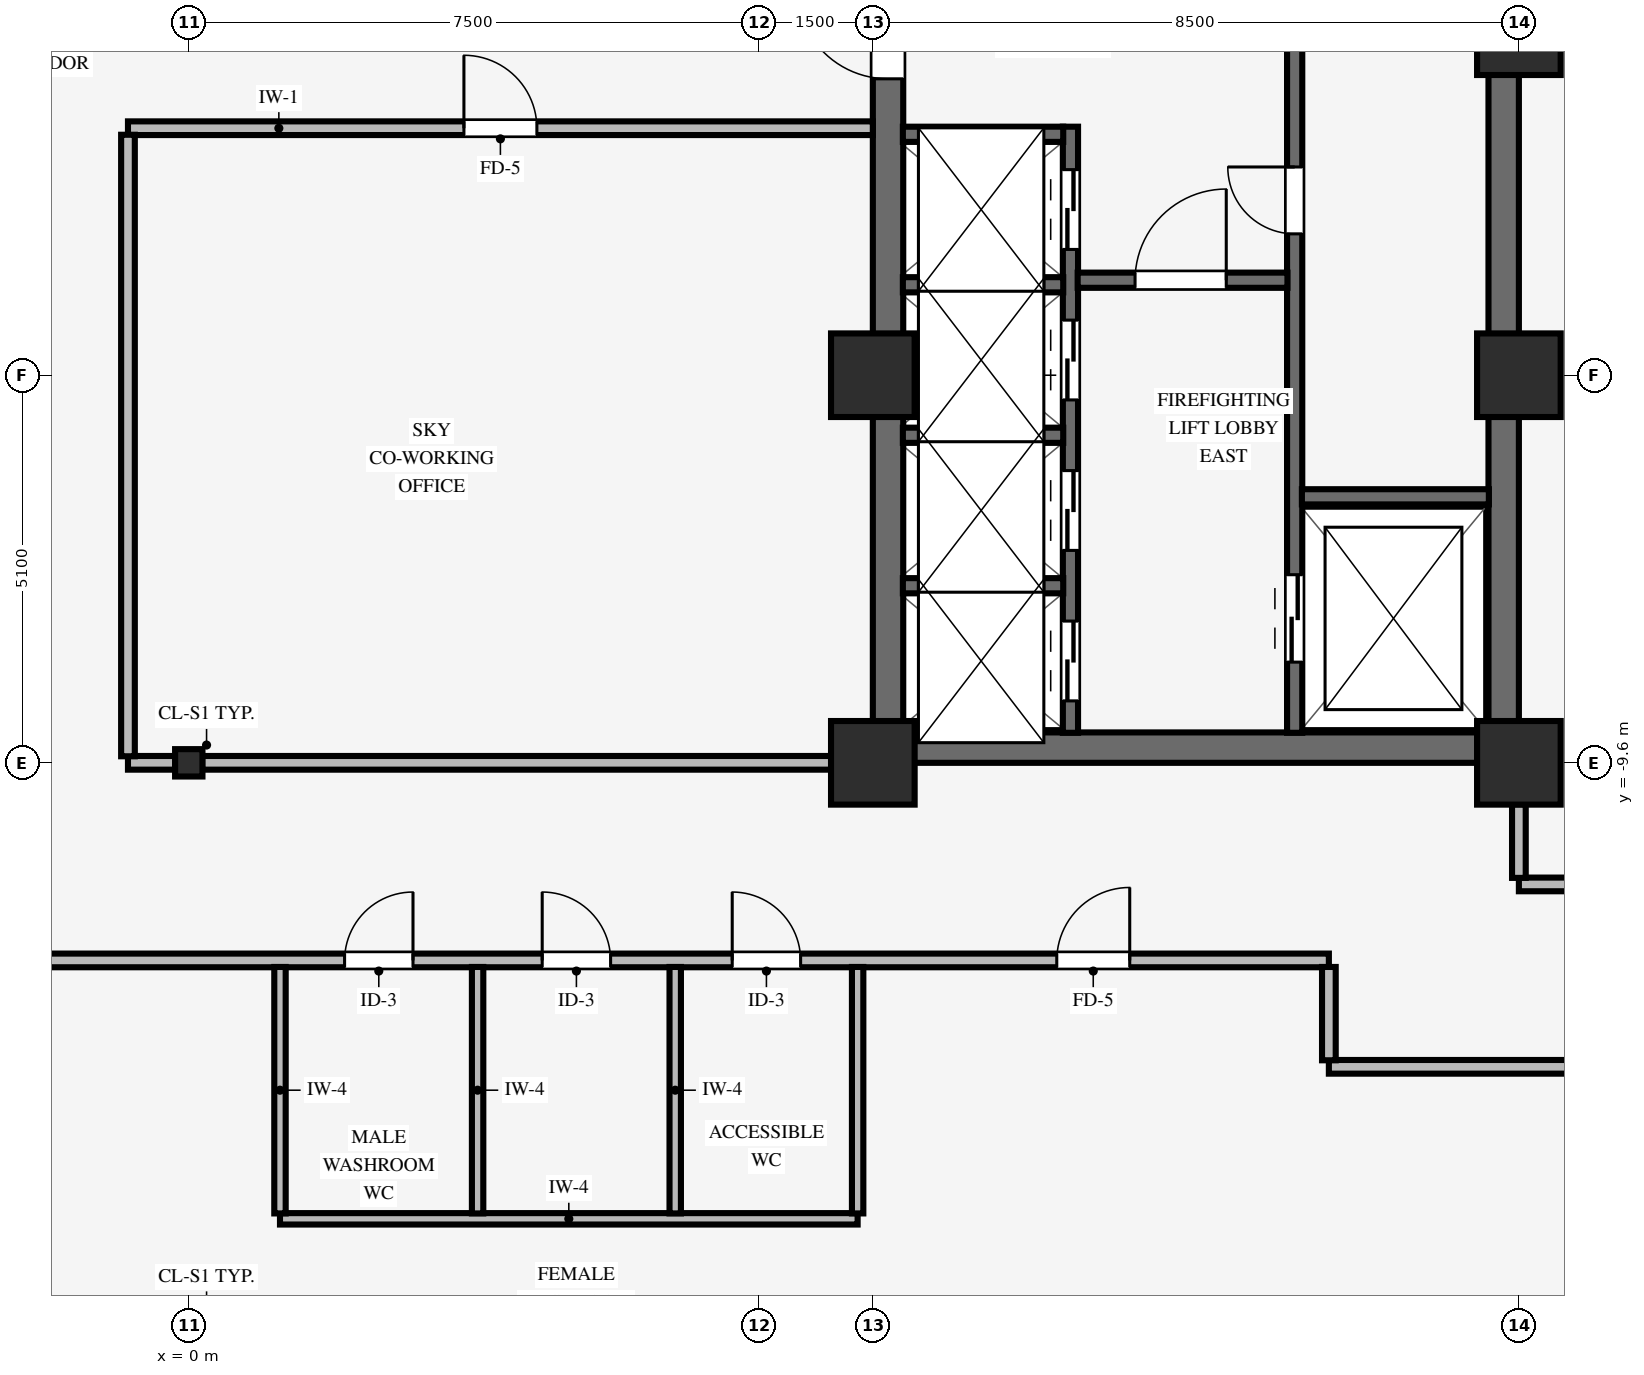
"""IFC4 building model, lengths in metres.
Left out: names, types, materials, properties, quantities, classifications, styles, units other than length and angle.
Written with IfcOpenShell. Run it as: python <this file> out.ifc"""

import sys

from ifc_helpers import new_model, si_unit, direction, frame, frame_2d, origin, origin_2d, place, context, subcontext, project, spatial, rectangle, i_section, extrude, source, transform, mapped, element, fill, save


model = new_model("IFC4")
c1 = context("Model", 3, precision=1e-05, world=origin(), true_north=direction((0.0, 1.0)))
c2 = subcontext(c1, "Body", "Model", "MODEL_VIEW")
j1 = project(units=[si_unit("LENGTHUNIT", "METRE"), si_unit("PLANEANGLEUNIT", "RADIAN")], contexts=[c1])
p1 = place(None, origin())
s1 = spatial("IfcSite", under=j1, at=p1, CompositionType="ELEMENT")
p2 = place(p1, origin())
s2 = spatial("IfcBuilding", under=s1, at=p2, CompositionType="ELEMENT")
p3 = place(p2, frame((0.0, 0.0, 120.2)))
s3 = spatial("IfcBuildingStorey", under=s2, at=p3, CompositionType="ELEMENT", Elevation=120.2)
p4 = place(p3, frame((9.0, -9.4, 0.0), z_axis=(0.0, 0.0, 1.0), x_axis=(1.0, 0.0, 0.0)))
e1 = element("IfcWall", 1, at=p4, inside=s3, PredefinedType="SHEAR", context=c2, shape_type="SweptSolid", body=[
    extrude(rectangle(XDim=8.5, YDim=0.4, at=frame_2d((4.25, 0.0))), origin(), (0.0, 0.0, 1.0), 3.37),
])
p5 = place(p3, frame((9.2, -9.205, 0.0), z_axis=(0.0, 0.0, 1.0), x_axis=(0.0, 1.0, 0.0)))
e2 = element("IfcWall", 2, at=p5, inside=s3, PredefinedType="SHEAR", context=c2, shape_type="SweptSolid", body=[
    extrude(rectangle(XDim=18.41, YDim=0.4, at=frame_2d((9.205, 0.0))), origin(), (0.0, 0.0, 1.0), 3.37),
])
p6 = place(p5, frame((8.605, 0.0, 0.0)))
e3 = element("IfcOpeningElement", 3, at=p6, cuts=e2, PredefinedType="OPENING", context=c2, shape_type="SweptSolid", body=[
    extrude(rectangle(XDim=1.2, YDim=2.15, at=frame_2d((0.6, 1.075))), frame((0.0, 0.21, 0.0), z_axis=(0.0, -1.0, 0.0), x_axis=(1.0, 0.0, 0.0)), (0.0, 0.0, 1.0), 0.42),
])
p7 = place(p3, frame((17.3, -9.205, 0.0), z_axis=(0.0, 0.0, 1.0), x_axis=(0.0, 1.0, 0.0)))
e4 = element("IfcWall", 4, at=p7, inside=s3, PredefinedType="SHEAR", context=c2, shape_type="SweptSolid", body=[
    extrude(rectangle(XDim=18.41, YDim=0.4, at=frame_2d((9.205, 0.0))), origin(), (0.0, 0.0, 1.0), 3.37),
])
for number, where, z_axis, x_axis in (
    (5, (9.0, -9.6, 0.0), (0.0, 0.0, 1.0), (1.0, 0.0, 0.0)),
    (6, (9.0, -4.5, 0.0), (0.0, 0.0, 1.0), (1.0, 0.0, 0.0)),
    (7, (17.5, -9.6, 0.0), (0.0, 0.0, 1.0), (1.0, 0.0, 0.0)),
    (8, (17.5, -4.5, 0.0), (0.0, 0.0, 1.0), (1.0, 0.0, 0.0)),
    (9, (17.5, 0.0, 0.0), (0.0, 0.0, 1.0), (1.0, 0.0, 0.0)),
):
    element("IfcColumn", number, at=place(p3, frame(where, z_axis=z_axis, x_axis=x_axis)), inside=s3, PredefinedType="COLUMN", context=c2, shape_type="SweptSolid", body=[
        extrude(rectangle(XDim=1.1, YDim=1.1, at=origin_2d()), origin(), (0.0, 0.0, 1.0), 3.37),
    ])
p8 = place(p3, frame((0.0, -9.6, 0.0), z_axis=(0.0, 0.0, 1.0), x_axis=(1.0, 0.0, 0.0)))
e10 = element("IfcColumn", 10, at=p8, inside=s3, PredefinedType="COLUMN", context=c2, shape_type="SweptSolid", body=[
    extrude(i_section(OverallWidth=0.36, OverallDepth=0.36, WebThickness=0.021, FlangeThickness=0.021, FilletRadius=0.018, at=origin_2d()), origin(), (0.0, 0.0, 1.0), 3.37),
])
p9 = place(p3, frame((14.55, -9.205, 0.0), z_axis=(0.0, 0.0, 1.0), x_axis=(0.0, 1.0, 0.0)))
e11 = element("IfcWall", 11, at=p9, inside=s3, PredefinedType="SHEAR", context=c2, shape_type="SweptSolid", body=[
    extrude(rectangle(XDim=10.11, YDim=0.2, at=frame_2d((5.055, 0.0))), origin(), (0.0, 0.0, 1.0), 3.37),
])
p10 = place(p9, frame((6.565, 0.0, 0.0)))
e12 = element("IfcOpeningElement", 12, at=p10, cuts=e11, PredefinedType="OPENING", context=c2, shape_type="SweptSolid", body=[
    extrude(rectangle(XDim=0.88, YDim=2.1, at=frame_2d((0.44, 1.05))), frame((0.0, 0.11, 0.0), z_axis=(0.0, -1.0, 0.0), x_axis=(1.0, 0.0, 0.0)), (0.0, 0.0, 1.0), 0.22),
])
p11 = place(p9, frame((0.93, 0.0, 0.0)))
e13 = element("IfcOpeningElement", 13, at=p11, cuts=e11, PredefinedType="OPENING", context=c2, shape_type="SweptSolid", body=[
    extrude(rectangle(XDim=1.15, YDim=2.15, at=frame_2d((0.575, 1.075))), frame((0.0, 0.11, 0.0), z_axis=(0.0, -1.0, 0.0), x_axis=(1.0, 0.0, 0.0)), (0.0, 0.0, 1.0), 0.22),
])
p12 = place(p3, frame((14.645, -6.1, 0.0), z_axis=(0.0, 0.0, 1.0), x_axis=(1.0, 0.0, 0.0)))
e14 = element("IfcWall", 14, at=p12, inside=s3, PredefinedType="SHEAR", context=c2, shape_type="SweptSolid", body=[
    extrude(rectangle(XDim=2.46, YDim=0.2, at=frame_2d((1.23, 0.0))), origin(), (0.0, 0.0, 1.0), 3.37),
])
p13 = place(p3, frame((11.6, -9.205, 0.0), z_axis=(0.0, 0.0, 1.0), x_axis=(0.0, 1.0, 0.0)))
e15 = element("IfcWall", 15, at=p13, inside=s3, PredefinedType="SHEAR", context=c2, shape_type="SweptSolid", body=[
    extrude(rectangle(XDim=7.975, YDim=0.2, at=frame_2d((3.988, 0.0))), origin(), (0.0, 0.0, 1.0), 3.37),
])
p14 = place(p13, frame((0.42, 0.0, 0.0)))
e16 = element("IfcOpeningElement", 16, at=p14, cuts=e15, PredefinedType="OPENING", context=c2, shape_type="SweptSolid", body=[
    extrude(rectangle(XDim=1.05, YDim=2.15, at=frame_2d((0.525, 1.075))), frame((0.0, 0.11, 0.0), z_axis=(0.0, -1.0, 0.0), x_axis=(1.0, 0.0, 0.0)), (0.0, 0.0, 1.0), 0.22),
])
p15 = place(p13, frame((2.4, 0.0, 0.0)))
e17 = element("IfcOpeningElement", 17, at=p15, cuts=e15, PredefinedType="OPENING", context=c2, shape_type="SweptSolid", body=[
    extrude(rectangle(XDim=1.05, YDim=2.15, at=frame_2d((0.525, 1.075))), frame((0.0, 0.11, 0.0), z_axis=(0.0, -1.0, 0.0), x_axis=(1.0, 0.0, 0.0)), (0.0, 0.0, 1.0), 0.22),
])
p16 = place(p13, frame((4.38, 0.0, 0.0)))
e18 = element("IfcOpeningElement", 18, at=p16, cuts=e15, PredefinedType="OPENING", context=c2, shape_type="SweptSolid", body=[
    extrude(rectangle(XDim=1.05, YDim=2.15, at=frame_2d((0.525, 1.075))), frame((0.0, 0.11, 0.0), z_axis=(0.0, -1.0, 0.0), x_axis=(1.0, 0.0, 0.0)), (0.0, 0.0, 1.0), 0.22),
])
p17 = place(p13, frame((6.36, 0.0, 0.0)))
e19 = element("IfcOpeningElement", 19, at=p17, cuts=e15, PredefinedType="OPENING", context=c2, shape_type="SweptSolid", body=[
    extrude(rectangle(XDim=1.05, YDim=2.15, at=frame_2d((0.525, 1.075))), frame((0.0, 0.11, 0.0), z_axis=(0.0, -1.0, 0.0), x_axis=(1.0, 0.0, 0.0)), (0.0, 0.0, 1.0), 0.22),
])
p18 = place(p3, frame((11.695, -3.25, 0.0), z_axis=(0.0, 0.0, 1.0), x_axis=(1.0, 0.0, 0.0)))
e20 = element("IfcWall", 20, at=p18, inside=s3, PredefinedType="SHEAR", context=c2, shape_type="SweptSolid", body=[
    extrude(rectangle(XDim=2.76, YDim=0.2, at=frame_2d((1.38, 0.0))), origin(), (0.0, 0.0, 1.0), 3.37),
])
p19 = place(p18, frame((0.755, 0.0, 0.0)))
e21 = element("IfcOpeningElement", 21, at=p19, cuts=e20, PredefinedType="OPENING", context=c2, shape_type="SweptSolid", body=[
    extrude(rectangle(XDim=1.2, YDim=2.15, at=frame_2d((0.6, 1.075))), frame((0.0, 0.11, 0.0), z_axis=(0.0, -1.0, 0.0), x_axis=(1.0, 0.0, 0.0)), (0.0, 0.0, 1.0), 0.22),
])
for number, where, z_axis, x_axis in (
    (22, (9.395, -7.27, 0.0), (0.0, 0.0, 1.0), (1.0, 0.0, 0.0)),
    (23, (9.395, -5.29, 0.0), (0.0, 0.0, 1.0), (1.0, 0.0, 0.0)),
    (24, (9.395, -3.31, 0.0), (0.0, 0.0, 1.0), (1.0, 0.0, 0.0)),
    (25, (9.395, -1.33, 0.0), (0.0, 0.0, 1.0), (1.0, 0.0, 0.0)),
):
    element("IfcWall", number, at=place(p3, frame(where, z_axis=z_axis, x_axis=x_axis)), inside=s3, PredefinedType="SHEAR", context=c2, shape_type="SweptSolid", body=[
        extrude(rectangle(XDim=2.11, YDim=0.2, at=frame_2d((1.055, 0.0))), origin(), (0.0, 0.0, 1.0), 3.37),
    ])
p20 = place(p3, frame((1.2, -15.6, 0.0), z_axis=(0.0, 0.0, 1.0), x_axis=(1.0, 0.0, 0.0)))
e26 = element("IfcWall", 26, at=p20, inside=s3, PredefinedType="PARTITIONING", context=c2, shape_type="SweptSolid", body=[
    extrude(rectangle(XDim=7.6, YDim=0.15, at=frame_2d((3.8, 0.0))), origin(), (0.0, 0.0, 1.0), 3.36),
])
p21 = place(p3, frame((15.0, -13.6, 0.0), z_axis=(0.0, 0.0, 1.0), x_axis=(1.0, 0.0, 0.0)))
e27 = element("IfcWall", 27, at=p21, inside=s3, PredefinedType="PARTITIONING", context=c2, shape_type="SweptSolid", body=[
    extrude(rectangle(XDim=5.8, YDim=0.18, at=frame_2d((2.9, 0.0))), origin(), (0.0, 0.0, 1.0), 2.998),
])
p22 = place(p3, frame((-15.0, -12.2, 0.0), z_axis=(0.0, 0.0, 1.0), x_axis=(1.0, 0.0, 0.0)))
e28 = element("IfcWall", 28, at=p22, inside=s3, PredefinedType="PARTITIONING", context=c2, shape_type="SweptSolid", body=[
    extrude(rectangle(XDim=30.0, YDim=0.18, at=frame_2d((15.0, 0.0))), origin(), (0.0, 0.0, 1.0), 3.36),
])
p23 = place(p22, frame((5.42, 0.0, 0.0)))
e29 = element("IfcOpeningElement", 29, at=p23, cuts=e28, PredefinedType="OPENING", context=c2, shape_type="SweptSolid", body=[
    extrude(rectangle(XDim=0.96, YDim=2.1, at=frame_2d((0.48, 1.05))), frame((0.0, 0.1, 0.0), z_axis=(0.0, -1.0, 0.0), x_axis=(1.0, 0.0, 0.0)), (0.0, 0.0, 1.0), 0.2),
])
p24 = place(p22, frame((26.42, 0.0, 0.0)))
e30 = element("IfcOpeningElement", 30, at=p24, cuts=e28, PredefinedType="OPENING", context=c2, shape_type="SweptSolid", body=[
    extrude(rectangle(XDim=0.96, YDim=2.1, at=frame_2d((0.48, 1.05))), frame((0.0, 0.1, 0.0), z_axis=(0.0, -1.0, 0.0), x_axis=(1.0, 0.0, 0.0)), (0.0, 0.0, 1.0), 0.2),
])
p25 = place(p22, frame((19.65, 0.0, 0.0)))
e31 = element("IfcOpeningElement", 31, at=p25, cuts=e28, PredefinedType="OPENING", context=c2, shape_type="SweptSolid", body=[
    extrude(rectangle(XDim=0.9, YDim=2.1, at=frame_2d((0.45, 1.05))), frame((0.0, 0.1, 0.0), z_axis=(0.0, -1.0, 0.0), x_axis=(1.0, 0.0, 0.0)), (0.0, 0.0, 1.0), 0.2),
])
p26 = place(p22, frame((17.05, 0.0, 0.0)))
e32 = element("IfcOpeningElement", 32, at=p26, cuts=e28, PredefinedType="OPENING", context=c2, shape_type="SweptSolid", body=[
    extrude(rectangle(XDim=0.9, YDim=2.1, at=frame_2d((0.45, 1.05))), frame((0.0, 0.1, 0.0), z_axis=(0.0, -1.0, 0.0), x_axis=(1.0, 0.0, 0.0)), (0.0, 0.0, 1.0), 0.2),
])
p27 = place(p22, frame((22.15, 0.0, 0.0)))
e33 = element("IfcOpeningElement", 33, at=p27, cuts=e28, PredefinedType="OPENING", context=c2, shape_type="SweptSolid", body=[
    extrude(rectangle(XDim=0.9, YDim=2.1, at=frame_2d((0.45, 1.05))), frame((0.0, 0.1, 0.0), z_axis=(0.0, -1.0, 0.0), x_axis=(1.0, 0.0, 0.0)), (0.0, 0.0, 1.0), 0.2),
])
p28 = place(p3, frame((17.5, -11.2, 0.0), z_axis=(0.0, 0.0, 1.0), x_axis=(1.0, 0.0, 0.0)))
e34 = element("IfcWall", 34, at=p28, inside=s3, PredefinedType="PARTITIONING", context=c2, shape_type="SweptSolid", body=[
    extrude(rectangle(XDim=8.58, YDim=0.18, at=frame_2d((4.29, 0.0))), origin(), (0.0, 0.0, 1.0), 3.36),
])
p29 = place(p28, frame((1.17, 0.0, 0.0)))
e35 = element("IfcOpeningElement", 35, at=p29, cuts=e34, PredefinedType="OPENING", context=c2, shape_type="SweptSolid", body=[
    extrude(rectangle(XDim=0.96, YDim=2.1, at=frame_2d((0.48, 1.05))), frame((0.0, 0.1, 0.0), z_axis=(0.0, -1.0, 0.0), x_axis=(1.0, 0.0, 0.0)), (0.0, 0.0, 1.0), 0.2),
])
p30 = place(p3, frame((-0.8, -9.6, 0.0), z_axis=(0.0, 0.0, 1.0), x_axis=(1.0, 0.0, 0.0)))
e36 = element("IfcWall", 36, at=p30, inside=s3, PredefinedType="PARTITIONING", context=c2, shape_type="SweptSolid", body=[
    extrude(rectangle(XDim=0.624, YDim=0.18, at=frame_2d((0.312, 0.0))), origin(), (0.0, 0.0, 1.0), 2.405),
])
p31 = place(p3, frame((0.176, -9.6, 0.0), z_axis=(0.0, 0.0, 1.0), x_axis=(1.0, 0.0, 0.0)))
e37 = element("IfcWall", 37, at=p31, inside=s3, PredefinedType="PARTITIONING", context=c2, shape_type="SweptSolid", body=[
    extrude(rectangle(XDim=8.278, YDim=0.18, at=frame_2d((4.139, 0.0))), origin(), (0.0, 0.0, 1.0), 2.405),
])
p32 = place(p3, frame((-0.8, -1.25, 0.0), z_axis=(0.0, 0.0, 1.0), x_axis=(1.0, 0.0, 0.0)))
e38 = element("IfcWall", 38, at=p32, inside=s3, PredefinedType="PARTITIONING", context=c2, shape_type="SweptSolid", body=[
    extrude(rectangle(XDim=9.8, YDim=0.18, at=frame_2d((4.9, 0.0))), origin(), (0.0, 0.0, 1.0), 3.36),
])
p33 = place(p32, frame((4.42, 0.0, 0.0)))
e39 = element("IfcOpeningElement", 39, at=p33, cuts=e38, PredefinedType="OPENING", context=c2, shape_type="SweptSolid", body=[
    extrude(rectangle(XDim=0.96, YDim=2.1, at=frame_2d((0.48, 1.05))), frame((0.0, 0.1, 0.0), z_axis=(0.0, -1.0, 0.0), x_axis=(1.0, 0.0, 0.0)), (0.0, 0.0, 1.0), 0.2),
])
p34 = place(p3, frame((-0.8, -9.514, 0.0), z_axis=(0.0, 0.0, 1.0), x_axis=(0.0, 1.0, 0.0)))
e40 = element("IfcWall", 40, at=p34, inside=s3, PredefinedType="PARTITIONING", context=c2, shape_type="SweptSolid", body=[
    extrude(rectangle(XDim=8.178, YDim=0.18, at=frame_2d((4.089, 0.0))), origin(), (0.0, 0.0, 1.0), 3.36),
])
for number, where, z_axis, x_axis in (
    (41, (1.2, -15.529, 0.0), (0.0, 0.0, 1.0), (0.0, 1.0, 0.0)),
    (42, (3.8, -15.529, 0.0), (0.0, 0.0, 1.0), (0.0, 1.0, 0.0)),
    (43, (6.4, -15.529, 0.0), (0.0, 0.0, 1.0), (0.0, 1.0, 0.0)),
):
    element("IfcWall", number, at=place(p3, frame(where, z_axis=z_axis, x_axis=x_axis)), inside=s3, PredefinedType="PARTITIONING", context=c2, shape_type="SweptSolid", body=[
        extrude(rectangle(XDim=3.243, YDim=0.15, at=frame_2d((1.622, 0.0))), origin(), (0.0, 0.0, 1.0), 3.36),
    ])
p35 = place(p3, frame((8.8, -15.529, 0.0), z_axis=(0.0, 0.0, 1.0), x_axis=(0.0, 1.0, 0.0)))
e44 = element("IfcWall", 44, at=p35, inside=s3, PredefinedType="PARTITIONING", context=c2, shape_type="SweptSolid", body=[
    extrude(rectangle(XDim=3.243, YDim=0.15, at=frame_2d((1.622, 0.0))), origin(), (0.0, 0.0, 1.0), 2.816),
])
p36 = place(p3, frame((15.0, -13.514, 0.0), z_axis=(0.0, 0.0, 1.0), x_axis=(0.0, 1.0, 0.0)))
e45 = element("IfcWall", 45, at=p36, inside=s3, PredefinedType="PARTITIONING", context=c2, shape_type="SweptSolid", body=[
    extrude(rectangle(XDim=1.228, YDim=0.18, at=frame_2d((0.614, 0.0))), origin(), (0.0, 0.0, 1.0), 3.36),
])
p37 = place(p3, frame((17.5, -11.114, 0.0), z_axis=(0.0, 0.0, 1.0), x_axis=(0.0, 1.0, 0.0)))
e46 = element("IfcWall", 46, at=p37, inside=s3, PredefinedType="PARTITIONING", context=c2, shape_type="SweptSolid", body=[
    extrude(rectangle(XDim=0.968, YDim=0.18, at=frame_2d((0.484, 0.0))), origin(), (0.0, 0.0, 1.0), 2.816),
])
m1 = source(origin(), c2, "Body", "SweptSolid", [
    extrude(rectangle(XDim=0.88, YDim=2.1, at=frame_2d((0.44, 1.05))), frame((0.0, 0.025, 0.0), z_axis=(0.0, -1.0, 0.0), x_axis=(1.0, 0.0, 0.0)), (0.0, 0.0, 1.0), 0.05),
])
p38 = place(p10, origin())
e47 = element("IfcDoor", 47, at=p38, inside=s3, OperationType="SINGLE_SWING_RIGHT", PredefinedType="DOOR", context=c2, shape_type="MappedRepresentation", body=[
    mapped(m1, transform((0.0, 0.0, 0.0), scale=1.0)),
])
fill(e12, e47)
m2 = source(origin(), c2, "Body", "SweptSolid", [
    extrude(rectangle(XDim=1.2, YDim=2.15, at=frame_2d((0.6, 1.075))), frame((0.0, 0.025, 0.0), z_axis=(0.0, -1.0, 0.0), x_axis=(1.0, 0.0, 0.0)), (0.0, 0.0, 1.0), 0.05),
])
p39 = place(p19, origin())
e48 = element("IfcDoor", 48, at=p39, inside=s3, OperationType="SINGLE_SWING_RIGHT", PredefinedType="DOOR", context=c2, shape_type="MappedRepresentation", body=[
    mapped(m2, transform((0.0, 0.0, 0.0), scale=1.0)),
])
fill(e21, e48)
p40 = place(p6, origin())
e49 = element("IfcDoor", 49, at=p40, inside=s3, OperationType="SINGLE_SWING_RIGHT", PredefinedType="DOOR", context=c2, shape_type="MappedRepresentation", body=[
    mapped(m2, transform((0.0, 0.0, 0.0), scale=1.0)),
])
fill(e3, e49)
m3 = source(origin(), c2, "Body", "SweptSolid", [
    extrude(rectangle(XDim=1.15, YDim=2.15, at=frame_2d((0.575, 1.075))), frame((0.0, 0.025, 0.0), z_axis=(0.0, -1.0, 0.0), x_axis=(1.0, 0.0, 0.0)), (0.0, 0.0, 1.0), 0.05),
])
p41 = place(p11, origin())
e50 = element("IfcDoor", 50, at=p41, inside=s3, OperationType="DOUBLE_DOOR_SLIDING", PredefinedType="DOOR", context=c2, shape_type="MappedRepresentation", body=[
    mapped(m3, transform((0.0, 0.0, 0.0), scale=1.0)),
])
fill(e13, e50)
m4 = source(origin(), c2, "Body", "SweptSolid", [
    extrude(rectangle(XDim=1.05, YDim=2.15, at=frame_2d((0.525, 1.075))), frame((0.0, 0.025, 0.0), z_axis=(0.0, -1.0, 0.0), x_axis=(1.0, 0.0, 0.0)), (0.0, 0.0, 1.0), 0.05),
])
p42 = place(p14, origin())
e51 = element("IfcDoor", 51, at=p42, inside=s3, OperationType="DOUBLE_DOOR_SLIDING", PredefinedType="DOOR", context=c2, shape_type="MappedRepresentation", body=[
    mapped(m4, transform((0.0, 0.0, 0.0), scale=1.0)),
])
fill(e16, e51)
p43 = place(p15, origin())
e52 = element("IfcDoor", 52, at=p43, inside=s3, OperationType="DOUBLE_DOOR_SLIDING", PredefinedType="DOOR", context=c2, shape_type="MappedRepresentation", body=[
    mapped(m4, transform((0.0, 0.0, 0.0), scale=1.0)),
])
fill(e17, e52)
p44 = place(p16, origin())
e53 = element("IfcDoor", 53, at=p44, inside=s3, OperationType="DOUBLE_DOOR_SLIDING", PredefinedType="DOOR", context=c2, shape_type="MappedRepresentation", body=[
    mapped(m4, transform((0.0, 0.0, 0.0), scale=1.0)),
])
fill(e18, e53)
p45 = place(p17, origin())
e54 = element("IfcDoor", 54, at=p45, inside=s3, OperationType="DOUBLE_DOOR_SLIDING", PredefinedType="DOOR", context=c2, shape_type="MappedRepresentation", body=[
    mapped(m4, transform((0.0, 0.0, 0.0), scale=1.0)),
])
fill(e19, e54)
m5 = source(origin(), c2, "Body", "SweptSolid", [
    extrude(rectangle(XDim=0.96, YDim=2.1, at=frame_2d((0.48, 1.05))), frame((0.0, 0.025, 0.0), z_axis=(0.0, -1.0, 0.0), x_axis=(1.0, 0.0, 0.0)), (0.0, 0.0, 1.0), 0.05),
])
p46 = place(p33, origin())
e55 = element("IfcDoor", 55, at=p46, inside=s3, OperationType="SINGLE_SWING_LEFT", PredefinedType="DOOR", context=c2, shape_type="MappedRepresentation", body=[
    mapped(m5, transform((0.0, 0.0, 0.0), scale=1.0)),
])
fill(e39, e55)
p47 = place(p24, origin())
e56 = element("IfcDoor", 56, at=p47, inside=s3, OperationType="SINGLE_SWING_RIGHT", PredefinedType="DOOR", context=c2, shape_type="MappedRepresentation", body=[
    mapped(m5, transform((0.0, 0.0, 0.0), scale=1.0)),
])
fill(e30, e56)
m6 = source(origin(), c2, "Body", "SweptSolid", [
    extrude(rectangle(XDim=0.9, YDim=2.1, at=frame_2d((0.45, 1.05))), frame((0.0, 0.025, 0.0), z_axis=(0.0, -1.0, 0.0), x_axis=(1.0, 0.0, 0.0)), (0.0, 0.0, 1.0), 0.05),
])
p48 = place(p25, origin())
e57 = element("IfcDoor", 57, at=p48, inside=s3, OperationType="SINGLE_SWING_LEFT", PredefinedType="DOOR", context=c2, shape_type="MappedRepresentation", body=[
    mapped(m6, transform((0.0, 0.0, 0.0), scale=1.0)),
])
fill(e31, e57)
p49 = place(p26, origin())
e58 = element("IfcDoor", 58, at=p49, inside=s3, OperationType="SINGLE_SWING_RIGHT", PredefinedType="DOOR", context=c2, shape_type="MappedRepresentation", body=[
    mapped(m6, transform((0.0, 0.0, 0.0), scale=1.0)),
])
fill(e32, e58)
p50 = place(p27, origin())
e59 = element("IfcDoor", 59, at=p50, inside=s3, OperationType="SINGLE_SWING_LEFT", PredefinedType="DOOR", context=c2, shape_type="MappedRepresentation", body=[
    mapped(m6, transform((0.0, 0.0, 0.0), scale=1.0)),
])
fill(e33, e59)
save(model, sys.argv[1])
